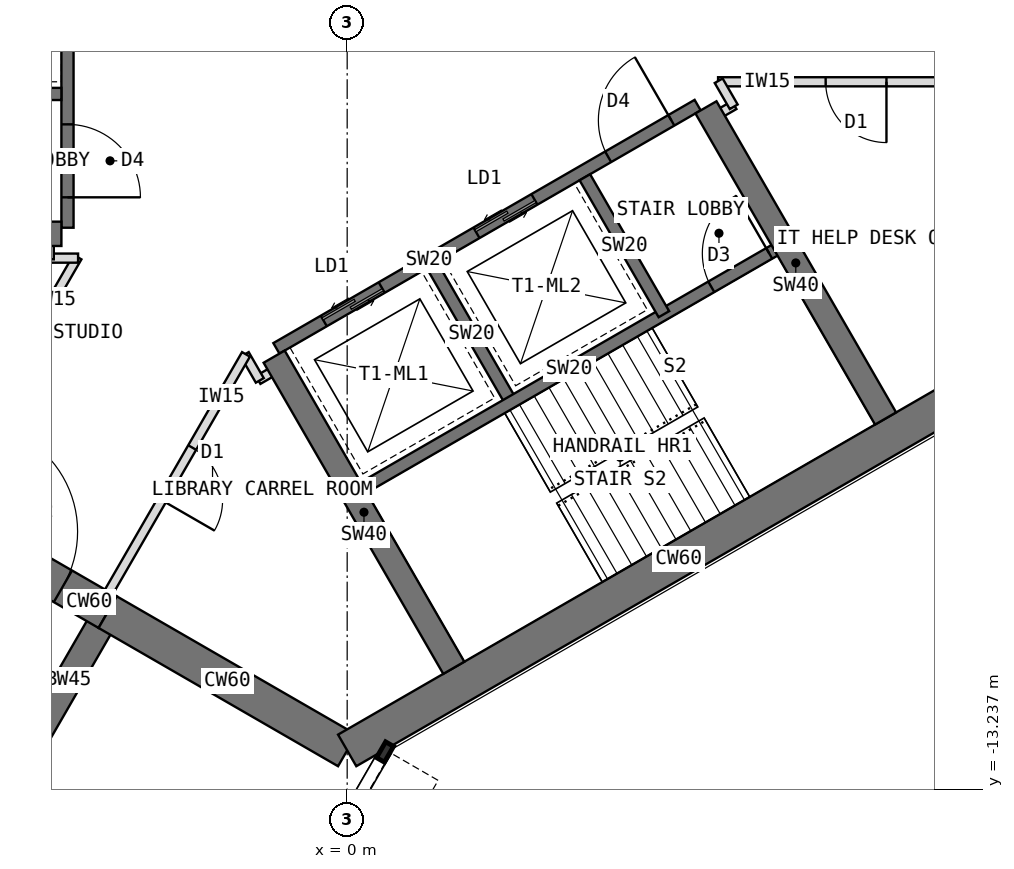
"""IFC4 building model, lengths in metres.
Left out: names, types, materials, properties, quantities, classifications, styles, units other than length and angle.
Written with IfcOpenShell. Run it as: python <this file> out.ifc"""

import sys

from ifc_helpers import new_model, si_unit, direction, frame, frame_2d, origin, place, context, subcontext, project, spatial, rectangle, extrude, element, fill, save


model = new_model("IFC4")
c1 = context("Model", 3, precision=1e-05, world=origin(), true_north=direction((0.0, 1.0)))
c2 = subcontext(c1, "Body", "Model", "MODEL_VIEW")
j1 = project(units=[si_unit("LENGTHUNIT", "METRE"), si_unit("PLANEANGLEUNIT", "RADIAN")], contexts=[c1])
p1 = place(None, origin())
s1 = spatial("IfcSite", under=j1, at=p1, CompositionType="ELEMENT")
p2 = place(p1, origin())
s2 = spatial("IfcBuilding", under=s1, at=p2, CompositionType="ELEMENT")
p3 = place(p2, frame((0.0, 0.0, 101.5)))
s3 = spatial("IfcBuildingStorey", under=s2, at=p3, CompositionType="ELEMENT", Elevation=101.5)
p4 = place(p3, frame((-6.97, -8.572, 0.0), z_axis=(0.0, 0.0, 1.0), x_axis=(0.866019471182, -0.500010275428, 0.0)))
e1 = element("IfcWall", 1, at=p4, inside=s3, PredefinedType="SHEAR", context=c2, shape_type="SweptSolid", body=[
    extrude(rectangle(XDim=3.5, YDim=0.6, at=frame_2d((1.75, 0.0))), origin(), (0.0, 0.0, 1.0), 4.0),
])
p5 = place(p4, frame((0.85, 0.0, 0.0)))
e2 = element("IfcOpeningElement", 2, at=p5, cuts=e1, PredefinedType="OPENING", context=c2, shape_type="SweptSolid", body=[
    extrude(rectangle(XDim=1.8, YDim=2.1, at=frame_2d((0.9, 1.05))), frame((0.0, 0.31, 0.0), z_axis=(0.0, -1.0, 0.0), x_axis=(1.0, 0.0, 0.0)), (0.0, 0.0, 1.0), 0.62),
])
p6 = place(p3, frame((-3.939, -10.322, 0.0), z_axis=(0.0, 0.0, 1.0), x_axis=(0.866011268655, -0.500024481964, 0.0)))
e3 = element("IfcWall", 3, at=p6, inside=s3, PredefinedType="SHEAR", context=c2, shape_type="SweptSolid", body=[
    extrude(rectangle(XDim=4.548, YDim=0.6, at=frame_2d((2.274, 0.0))), origin(), (0.0, 0.0, 1.0), 4.0),
])
p7 = place(p3, frame((0.0, -12.596, 0.0), z_axis=(0.0, 0.0, 1.0), x_axis=(0.866021940709, 0.500005998175, 0.0)))
e4 = element("IfcWall", 4, at=p7, inside=s3, PredefinedType="SHEAR", context=c2, shape_type="SweptSolid", body=[
    extrude(rectangle(XDim=12.596, YDim=0.6, at=frame_2d((6.298, 0.0))), origin(), (0.0, 0.0, 1.0), 4.0),
])
p8 = place(p3, frame((-3.939, -10.322, 0.0), z_axis=(0.0, 0.0, 1.0), x_axis=(-0.499918158782, -0.866072649678, 0.0)))
e5 = element("IfcWall", 5, at=p8, inside=s3, PredefinedType="SHEAR", context=c2, shape_type="SweptSolid", body=[
    extrude(rectangle(XDim=2.592, YDim=0.45, at=frame_2d((1.296, 0.0))), origin(), (0.0, 0.0, 1.0), 4.0),
])
p9 = place(p3, frame((-4.6, 4.0, 0.0), z_axis=(0.0, 0.0, 1.0), x_axis=(0.0, -1.0, 0.0)))
e6 = element("IfcWall", 6, at=p9, inside=s3, PredefinedType="SHEAR", context=c2, shape_type="SweptSolid", body=[
    extrude(rectangle(XDim=8.0, YDim=0.2, at=frame_2d((4.0, 0.0))), origin(), (0.0, 0.0, 1.0), 4.0),
])
p10 = place(p9, frame((6.3, 0.0, 0.0)))
e7 = element("IfcOpeningElement", 7, at=p10, cuts=e6, PredefinedType="OPENING", context=c2, shape_type="SweptSolid", body=[
    extrude(rectangle(XDim=1.2, YDim=2.1, at=frame_2d((0.6, 1.05))), frame((0.0, 0.11, 0.0), z_axis=(0.0, -1.0, 0.0), x_axis=(1.0, 0.0, 0.0)), (0.0, 0.0, 1.0), 0.22),
])
p11 = place(p9, frame((0.9, 0.0, 0.0)))
e8 = element("IfcOpeningElement", 8, at=p11, cuts=e6, PredefinedType="OPENING", context=c2, shape_type="SweptSolid", body=[
    extrude(rectangle(XDim=1.1, YDim=2.2, at=frame_2d((0.55, 1.1))), frame((0.0, 0.11, 0.0), z_axis=(0.0, -1.0, 0.0), x_axis=(1.0, 0.0, 0.0)), (0.0, 0.0, 1.0), 0.22),
])
p12 = place(p3, frame((-4.7, -1.8, 0.0), z_axis=(0.0, 0.0, 1.0), x_axis=(-1.0, 0.0, 0.0)))
e9 = element("IfcWall", 9, at=p12, inside=s3, PredefinedType="SHEAR", context=c2, shape_type="SweptSolid", body=[
    extrude(rectangle(XDim=2.6, YDim=0.2, at=frame_2d((1.3, 0.0))), origin(), (0.0, 0.0, 1.0), 4.0),
])
p13 = place(p12, frame((0.55, 0.0, 0.0)))
e10 = element("IfcOpeningElement", 10, at=p13, cuts=e9, PredefinedType="OPENING", context=c2, shape_type="SweptSolid", body=[
    extrude(rectangle(XDim=1.3, YDim=2.2, at=frame_2d((0.65, 1.1))), frame((0.0, 0.11, 0.0), z_axis=(0.0, -1.0, 0.0), x_axis=(1.0, 0.0, 0.0)), (0.0, 0.0, 1.0), 0.22),
])
p14 = place(p3, frame((-4.7, -4.1, 0.0), z_axis=(0.0, 0.0, 1.0), x_axis=(-1.0, 0.0, 0.0)))
e11 = element("IfcWall", 11, at=p14, inside=s3, PredefinedType="SHEAR", context=c2, shape_type="SweptSolid", body=[
    extrude(rectangle(XDim=5.908, YDim=0.4, at=frame_2d((2.954, 0.0))), origin(), (0.0, 0.0, 1.0), 4.0),
])
p15 = place(p3, frame((-1.164, -5.984, 0.0), z_axis=(0.0, 0.0, 1.0), x_axis=(0.866026010844, 0.49999894854, 0.0)))
e12 = element("IfcWall", 12, at=p15, inside=s3, PredefinedType="SHEAR", context=c2, shape_type="SweptSolid", body=[
    extrude(rectangle(XDim=8.0, YDim=0.2, at=frame_2d((4.0, 0.0))), origin(), (0.0, 0.0, 1.0), 4.0),
])
p16 = place(p15, frame((6.3, 0.0, 0.0)))
e13 = element("IfcOpeningElement", 13, at=p16, cuts=e12, PredefinedType="OPENING", context=c2, shape_type="SweptSolid", body=[
    extrude(rectangle(XDim=1.2, YDim=2.1, at=frame_2d((0.6, 1.05))), frame((0.0, 0.11, 0.0), z_axis=(0.0, -1.0, 0.0), x_axis=(1.0, 0.0, 0.0)), (0.0, 0.0, 1.0), 0.22),
])
p17 = place(p15, frame((0.9, 0.0, 0.0)))
e14 = element("IfcOpeningElement", 14, at=p17, cuts=e12, PredefinedType="OPENING", context=c2, shape_type="SweptSolid", body=[
    extrude(rectangle(XDim=1.1, YDim=2.2, at=frame_2d((0.55, 1.1))), frame((0.0, 0.11, 0.0), z_axis=(0.0, -1.0, 0.0), x_axis=(1.0, 0.0, 0.0)), (0.0, 0.0, 1.0), 0.22),
])
p18 = place(p15, frame((3.8, 0.0, 0.0)))
e15 = element("IfcOpeningElement", 15, at=p18, cuts=e12, PredefinedType="OPENING", context=c2, shape_type="SweptSolid", body=[
    extrude(rectangle(XDim=1.1, YDim=2.2, at=frame_2d((0.55, 1.1))), frame((0.0, 0.11, 0.0), z_axis=(0.0, -1.0, 0.0), x_axis=(1.0, 0.0, 0.0)), (0.0, 0.0, 1.0), 0.22),
])
p19 = place(p3, frame((1.397, -4.62, 0.0), z_axis=(0.0, 0.0, 1.0), x_axis=(0.499936506574, -0.866062058628, 0.0)))
e16 = element("IfcWall", 16, at=p19, inside=s3, PredefinedType="SHEAR", context=c2, shape_type="SweptSolid", body=[
    extrude(rectangle(XDim=2.6, YDim=0.2, at=frame_2d((1.3, 0.0))), origin(), (0.0, 0.0, 1.0), 4.0),
])
p20 = place(p3, frame((3.909, -3.17, 0.0), z_axis=(0.0, 0.0, 1.0), x_axis=(0.49997716683, -0.86603858612, 0.0)))
e17 = element("IfcWall", 17, at=p20, inside=s3, PredefinedType="SHEAR", context=c2, shape_type="SweptSolid", body=[
    extrude(rectangle(XDim=2.6, YDim=0.2, at=frame_2d((1.3, 0.0))), origin(), (0.0, 0.0, 1.0), 4.0),
])
p21 = place(p3, frame((0.186, -8.322, 0.0), z_axis=(0.0, 0.0, 1.0), x_axis=(0.866026010844, 0.49999894854, 0.0)))
e18 = element("IfcWall", 18, at=p21, inside=s3, PredefinedType="SHEAR", context=c2, shape_type="SweptSolid", body=[
    extrude(rectangle(XDim=8.0, YDim=0.2, at=frame_2d((4.0, 0.0))), origin(), (0.0, 0.0, 1.0), 4.0),
])
p22 = place(p21, frame((6.7, 0.0, 0.0)))
e19 = element("IfcOpeningElement", 19, at=p22, cuts=e18, PredefinedType="OPENING", context=c2, shape_type="SweptSolid", body=[
    extrude(rectangle(XDim=1.1, YDim=2.1, at=frame_2d((0.55, 1.05))), frame((0.0, 0.11, 0.0), z_axis=(0.0, -1.0, 0.0), x_axis=(1.0, 0.0, 0.0)), (0.0, 0.0, 1.0), 0.22),
])
p23 = place(p3, frame((5.901, -2.02, 0.0), z_axis=(0.0, 0.0, 1.0), x_axis=(0.500027676417, -0.866009424208, 0.0)))
e20 = element("IfcWall", 20, at=p23, inside=s3, PredefinedType="SHEAR", context=c2, shape_type="SweptSolid", body=[
    extrude(rectangle(XDim=5.908, YDim=0.4, at=frame_2d((2.954, 0.0))), origin(), (0.0, 0.0, 1.0), 4.0),
])
p24 = place(p3, frame((-1.201, -6.12, 0.0), z_axis=(0.0, 0.0, 1.0), x_axis=(0.49999668571, -0.866027317282, 0.0)))
e21 = element("IfcWall", 21, at=p24, inside=s3, PredefinedType="SHEAR", context=c2, shape_type="SweptSolid", body=[
    extrude(rectangle(XDim=5.908, YDim=0.4, at=frame_2d((2.954, 0.0))), origin(), (0.0, 0.0, 1.0), 4.0),
])
for number, where, z_axis, x_axis in (
    (22, (6.365, -1.983, 0.0), (0.0, 0.0, 1.0), (-0.866, -0.5, 0.0)),
    (23, (-1.092, -6.289, 0.0), (0.0, 0.0, 1.0), (-0.866, -0.5, 0.0)),
):
    element("IfcWall", number, at=place(p3, frame(where, z_axis=z_axis, x_axis=x_axis)), inside=s3, PredefinedType="PARTITIONING", context=c2, shape_type="SweptSolid", body=[
        extrude(rectangle(XDim=0.43, YDim=0.15, at=frame_2d((0.215, 0.0))), origin(), (0.0, 0.0, 1.0), 3.8),
    ])
p25 = place(p3, frame((-1.437, -6.511, 0.0), z_axis=(0.0, 0.0, 1.0), x_axis=(-0.50033519877, 0.865831790172, 0.0)))
e24 = element("IfcWall", 24, at=p25, inside=s3, PredefinedType="PARTITIONING", context=c2, shape_type="SweptSolid", body=[
    extrude(rectangle(XDim=0.494, YDim=0.15, at=frame_2d((0.247, 0.0))), origin(), (0.0, 0.0, 1.0), 3.8),
])
p26 = place(p3, frame((-1.664, -6.083, 0.0), z_axis=(0.0, 0.0, 1.0), x_axis=(-0.500032713409, -0.866006515865, 0.0)))
e25 = element("IfcWall", 25, at=p26, inside=s3, PredefinedType="PARTITIONING", context=c2, shape_type="SweptSolid", body=[
    extrude(rectangle(XDim=4.518, YDim=0.15, at=frame_2d((2.259, 0.0))), origin(), (0.0, 0.0, 1.0), 3.8),
])
p27 = place(p26, frame((1.769, 0.0, 0.0)))
e26 = element("IfcOpeningElement", 26, at=p27, cuts=e25, PredefinedType="OPENING", context=c2, shape_type="SweptSolid", body=[
    extrude(rectangle(XDim=1.0, YDim=2.1, at=frame_2d((0.5, 1.05))), frame((0.0, 0.085, 0.0), z_axis=(0.0, -1.0, 0.0), x_axis=(1.0, 0.0, 0.0)), (0.0, 0.0, 1.0), 0.17),
])
p28 = place(p3, frame((-6.695, -8.396, 0.0), z_axis=(0.0, 0.0, 1.0), x_axis=(0.500009315796, 0.86602002524, 0.0)))
e27 = element("IfcWall", 27, at=p28, inside=s3, PredefinedType="PARTITIONING", context=c2, shape_type="SweptSolid", body=[
    extrude(rectangle(XDim=4.519, YDim=0.15, at=frame_2d((2.259, 0.0))), origin(), (0.0, 0.0, 1.0), 3.8),
])
p29 = place(p28, frame((1.749, 0.0, 0.0)))
e28 = element("IfcOpeningElement", 28, at=p29, cuts=e27, PredefinedType="OPENING", context=c2, shape_type="SweptSolid", body=[
    extrude(rectangle(XDim=1.0, YDim=2.1, at=frame_2d((0.5, 1.05))), frame((0.0, 0.085, 0.0), z_axis=(0.0, -1.0, 0.0), x_axis=(1.0, 0.0, 0.0)), (0.0, 0.0, 1.0), 0.17),
])
p30 = place(p3, frame((-4.426, -4.5, 0.0), z_axis=(0.0, 0.0, 1.0), x_axis=(-1.0, 0.0, 0.0)))
e29 = element("IfcWall", 29, at=p30, inside=s3, PredefinedType="PARTITIONING", context=c2, shape_type="SweptSolid", body=[
    extrude(rectangle(XDim=0.494, YDim=0.15, at=frame_2d((0.247, 0.0))), origin(), (0.0, 0.0, 1.0), 3.8),
])
p31 = place(p3, frame((-4.9, -4.52, 0.0), z_axis=(0.0, 0.0, 1.0), x_axis=(0.0, 1.0, 0.0)))
e30 = element("IfcWall", 30, at=p31, inside=s3, PredefinedType="PARTITIONING", context=c2, shape_type="SweptSolid", body=[
    extrude(rectangle(XDim=0.43, YDim=0.15, at=frame_2d((0.215, 0.0))), origin(), (0.0, 0.0, 1.0), 3.8),
])
p32 = place(p3, frame((10.618, -1.6, 0.0), z_axis=(0.0, 0.0, 1.0), x_axis=(-1.0, 0.0, 0.0)))
e31 = element("IfcWall", 31, at=p32, inside=s3, PredefinedType="PARTITIONING", context=c2, shape_type="SweptSolid", body=[
    extrude(rectangle(XDim=4.519, YDim=0.15, at=frame_2d((2.259, 0.0))), origin(), (0.0, 0.0, 1.0), 3.8),
])
p33 = place(p32, frame((1.749, 0.0, 0.0)))
e32 = element("IfcOpeningElement", 32, at=p33, cuts=e31, PredefinedType="OPENING", context=c2, shape_type="SweptSolid", body=[
    extrude(rectangle(XDim=1.0, YDim=2.1, at=frame_2d((0.5, 1.05))), frame((0.0, 0.085, 0.0), z_axis=(0.0, -1.0, 0.0), x_axis=(1.0, 0.0, 0.0)), (0.0, 0.0, 1.0), 0.17),
])
p34 = place(p3, frame((6.11, -1.583, 0.0), z_axis=(0.0, 0.0, 1.0), x_axis=(0.50033519877, -0.865831790172, 0.0)))
e33 = element("IfcWall", 33, at=p34, inside=s3, PredefinedType="PARTITIONING", context=c2, shape_type="SweptSolid", body=[
    extrude(rectangle(XDim=0.494, YDim=0.15, at=frame_2d((0.247, 0.0))), origin(), (0.0, 0.0, 1.0), 3.8),
])
p35 = place(p10, origin())
e34 = element("IfcDoor", 34, at=p35, inside=s3, OperationType="SINGLE_SWING_RIGHT", PredefinedType="DOOR", context=c2, shape_type="SweptSolid", body=[
    extrude(rectangle(XDim=1.2, YDim=2.1, at=frame_2d((0.6, 1.05))), frame((0.0, 0.025, 0.0), z_axis=(0.0, -1.0, 0.0), x_axis=(1.0, 0.0, 0.0)), (0.0, 0.0, 1.0), 0.05),
])
fill(e7, e34)
p36 = place(p16, origin())
e35 = element("IfcDoor", 35, at=p36, inside=s3, OperationType="SINGLE_SWING_RIGHT", PredefinedType="DOOR", context=c2, shape_type="SweptSolid", body=[
    extrude(rectangle(XDim=1.2, YDim=2.1, at=frame_2d((0.6, 1.05))), frame((0.0, 0.025, 0.0), z_axis=(0.0, -1.0, 0.0), x_axis=(1.0, 0.0, 0.0)), (0.0, 0.0, 1.0), 0.05),
])
fill(e13, e35)
p37 = place(p17, origin())
e36 = element("IfcDoor", 36, at=p37, inside=s3, OperationType="DOUBLE_DOOR_SLIDING", PredefinedType="DOOR", context=c2, shape_type="SweptSolid", body=[
    extrude(rectangle(XDim=1.1, YDim=2.2, at=frame_2d((0.55, 1.1))), frame((0.0, 0.025, 0.0), z_axis=(0.0, -1.0, 0.0), x_axis=(1.0, 0.0, 0.0)), (0.0, 0.0, 1.0), 0.05),
])
fill(e14, e36)
p38 = place(p18, origin())
e37 = element("IfcDoor", 37, at=p38, inside=s3, OperationType="DOUBLE_DOOR_SLIDING", PredefinedType="DOOR", context=c2, shape_type="SweptSolid", body=[
    extrude(rectangle(XDim=1.1, YDim=2.2, at=frame_2d((0.55, 1.1))), frame((0.0, 0.025, 0.0), z_axis=(0.0, -1.0, 0.0), x_axis=(1.0, 0.0, 0.0)), (0.0, 0.0, 1.0), 0.05),
])
fill(e15, e37)
p39 = place(p22, origin())
e38 = element("IfcDoor", 38, at=p39, inside=s3, OperationType="SINGLE_SWING_RIGHT", PredefinedType="DOOR", context=c2, shape_type="SweptSolid", body=[
    extrude(rectangle(XDim=1.1, YDim=2.1, at=frame_2d((0.55, 1.05))), frame((0.0, 0.025, 0.0), z_axis=(0.0, -1.0, 0.0), x_axis=(1.0, 0.0, 0.0)), (0.0, 0.0, 1.0), 0.05),
])
fill(e19, e38)
p40 = place(p5, origin())
e39 = element("IfcDoor", 39, at=p40, inside=s3, OperationType="DOUBLE_DOOR_DOUBLE_SWING", PredefinedType="DOOR", context=c2, shape_type="SweptSolid", body=[
    extrude(rectangle(XDim=1.72, YDim=2.06, at=frame_2d((0.9, 1.03))), frame((0.0, 0.025, 0.0), z_axis=(0.0, -1.0, 0.0), x_axis=(1.0, 0.0, 0.0)), (0.0, 0.0, 1.0), 0.05),
    extrude(rectangle(XDim=0.04, YDim=2.1, at=frame_2d((0.02, 1.05))), frame((0.0, 0.3, 0.0), z_axis=(0.0, -1.0, 0.0), x_axis=(1.0, 0.0, 0.0)), (0.0, 0.0, 1.0), 0.6),
    extrude(rectangle(XDim=0.04, YDim=2.1, at=frame_2d((1.78, 1.05))), frame((0.0, 0.3, 0.0), z_axis=(0.0, -1.0, 0.0), x_axis=(1.0, 0.0, 0.0)), (0.0, 0.0, 1.0), 0.6),
    extrude(rectangle(XDim=1.72, YDim=0.04, at=frame_2d((0.9, 2.08))), frame((0.0, 0.3, 0.0), z_axis=(0.0, -1.0, 0.0), x_axis=(1.0, 0.0, 0.0)), (0.0, 0.0, 1.0), 0.6),
])
fill(e2, e39)
p41 = place(p27, origin())
e40 = element("IfcDoor", 40, at=p41, inside=s3, OperationType="SINGLE_SWING_RIGHT", PredefinedType="DOOR", context=c2, shape_type="SweptSolid", body=[
    extrude(rectangle(XDim=1.0, YDim=2.1, at=frame_2d((0.5, 1.05))), frame((0.0, 0.025, 0.0), z_axis=(0.0, -1.0, 0.0), x_axis=(1.0, 0.0, 0.0)), (0.0, 0.0, 1.0), 0.05),
])
fill(e26, e40)
p42 = place(p33, origin())
e41 = element("IfcDoor", 41, at=p42, inside=s3, OperationType="SINGLE_SWING_LEFT", PredefinedType="DOOR", context=c2, shape_type="SweptSolid", body=[
    extrude(rectangle(XDim=1.0, YDim=2.1, at=frame_2d((0.5, 1.05))), frame((0.0, 0.025, 0.0), z_axis=(0.0, -1.0, 0.0), x_axis=(1.0, 0.0, 0.0)), (0.0, 0.0, 1.0), 0.05),
])
fill(e32, e41)
save(model, sys.argv[1])
